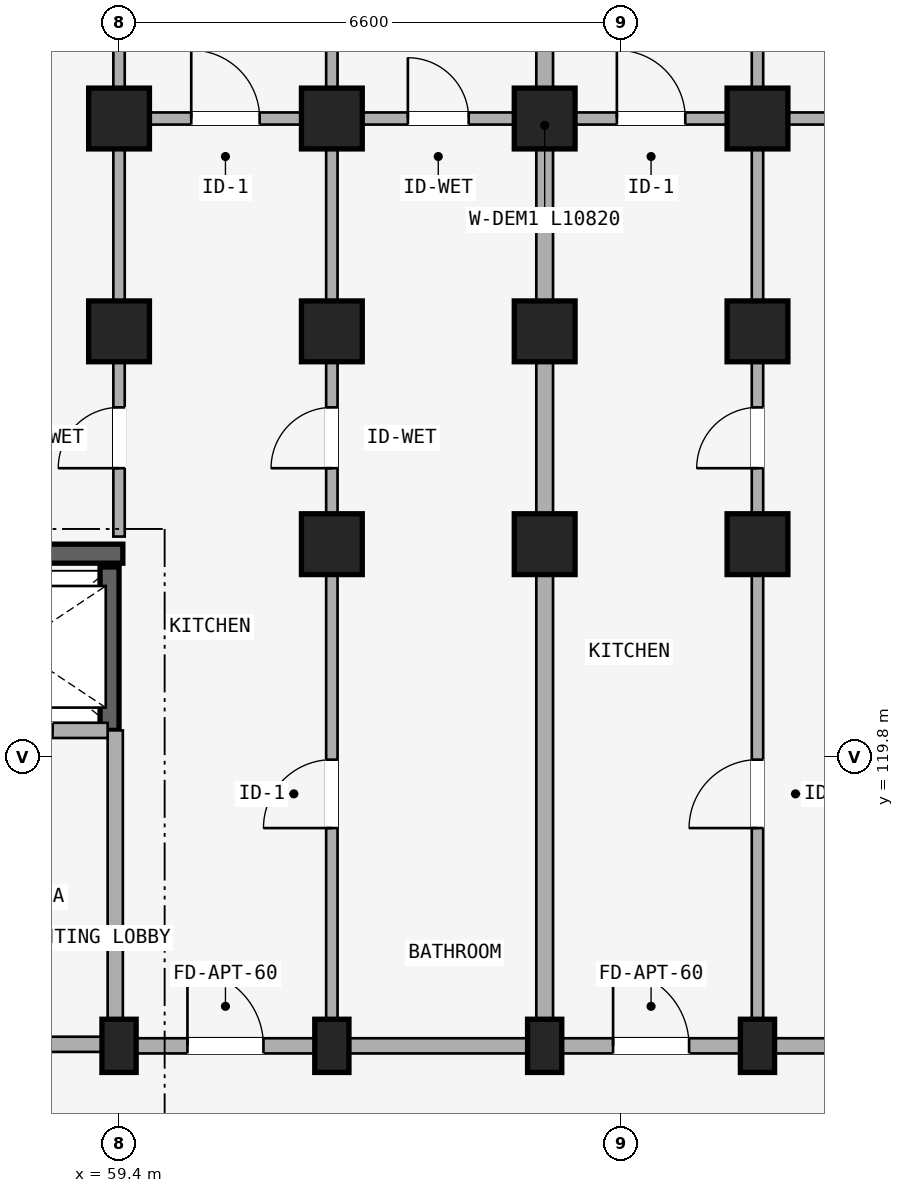
"""IFC4 building model, lengths in metres.
Left out: names, types, materials, properties, quantities, classifications, styles, units other than length and angle.
Written with IfcOpenShell. Run it as: python <this file> out.ifc"""

import sys

from ifc_helpers import new_model, si_unit, direction, frame, frame_2d, origin, origin_2d, place, context, subcontext, project, spatial, rectangle, extrude, element, fill, save


model = new_model("IFC4")
c1 = context("Model", 3, precision=1e-05, world=origin(), true_north=direction((0.0, 1.0)))
c2 = subcontext(c1, "Body", "Model", "MODEL_VIEW")
j1 = project(units=[si_unit("LENGTHUNIT", "METRE"), si_unit("PLANEANGLEUNIT", "RADIAN")], contexts=[c1])
p1 = place(None, origin())
s1 = spatial("IfcSite", under=j1, at=p1, CompositionType="ELEMENT")
p2 = place(p1, origin())
s2 = spatial("IfcBuilding", under=s1, at=p2, CompositionType="ELEMENT")
p3 = place(p2, frame((0.0, 0.0, 11.85)))
s3 = spatial("IfcBuildingStorey", under=s2, at=p3, CompositionType="ELEMENT", Elevation=11.85)
p4 = place(p3, frame((56.65, 122.475, 0.0), z_axis=(0.0, 0.0, 1.0), x_axis=(1.0, 0.0, 0.0)))
e1 = element("IfcWall", 1, at=p4, inside=s3, PredefinedType="SHEAR", context=c2, shape_type="SweptSolid", body=[
    extrude(rectangle(XDim=2.8, YDim=0.25, at=frame_2d((1.4, 0.0))), origin(), (0.0, 0.0, 1.0), 2.93),
])
p5 = place(p3, frame((59.275, 120.15, 0.0), z_axis=(0.0, 0.0, 1.0), x_axis=(0.0, 1.0, 0.0)))
e2 = element("IfcWall", 2, at=p5, inside=s3, PredefinedType="SHEAR", context=c2, shape_type="SweptSolid", body=[
    extrude(rectangle(XDim=2.15, YDim=0.25, at=frame_2d((1.075, 0.0))), origin(), (0.0, 0.0, 1.0), 2.93),
])
p6 = place(p3, frame((59.4, 116.0, 0.0), z_axis=(0.0, 0.0, 1.0), x_axis=(1.0, 0.0, 0.0)))
e3 = element("IfcColumn", 3, at=p6, inside=s3, PredefinedType="COLUMN", context=c2, shape_type="SweptSolid", body=[
    extrude(rectangle(XDim=0.45, YDim=0.7, at=origin_2d()), origin(), (0.0, 0.0, 1.0), 2.93),
])
for number, where, z_axis, x_axis in (
    (4, (59.4, 125.4, 0.0), (0.0, 0.0, 1.0), (1.0, 0.0, 0.0)),
    (5, (59.4, 128.2, 0.0), (0.0, 0.0, 1.0), (1.0, 0.0, 0.0)),
):
    element("IfcColumn", number, at=place(p3, frame(where, z_axis=z_axis, x_axis=x_axis)), inside=s3, PredefinedType="COLUMN", context=c2, shape_type="SweptSolid", body=[
        extrude(rectangle(XDim=0.8, YDim=0.8, at=origin_2d()), origin(), (0.0, 0.0, 1.0), 2.93),
    ])
p7 = place(p3, frame((62.2, 116.0, 0.0), z_axis=(0.0, 0.0, 1.0), x_axis=(1.0, 0.0, 0.0)))
e6 = element("IfcColumn", 6, at=p7, inside=s3, PredefinedType="COLUMN", context=c2, shape_type="SweptSolid", body=[
    extrude(rectangle(XDim=0.45, YDim=0.7, at=origin_2d()), origin(), (0.0, 0.0, 1.0), 2.93),
])
for number, where, z_axis, x_axis in (
    (7, (62.2, 122.6, 0.0), (0.0, 0.0, 1.0), (1.0, 0.0, 0.0)),
    (8, (62.2, 125.4, 0.0), (0.0, 0.0, 1.0), (1.0, 0.0, 0.0)),
    (9, (62.2, 128.2, 0.0), (0.0, 0.0, 1.0), (1.0, 0.0, 0.0)),
):
    element("IfcColumn", number, at=place(p3, frame(where, z_axis=z_axis, x_axis=x_axis)), inside=s3, PredefinedType="COLUMN", context=c2, shape_type="SweptSolid", body=[
        extrude(rectangle(XDim=0.8, YDim=0.8, at=origin_2d()), origin(), (0.0, 0.0, 1.0), 2.93),
    ])
p8 = place(p3, frame((65.0, 116.0, 0.0), z_axis=(0.0, 0.0, 1.0), x_axis=(1.0, 0.0, 0.0)))
e10 = element("IfcColumn", 10, at=p8, inside=s3, PredefinedType="COLUMN", context=c2, shape_type="SweptSolid", body=[
    extrude(rectangle(XDim=0.45, YDim=0.7, at=origin_2d()), origin(), (0.0, 0.0, 1.0), 2.93),
])
for number, where, z_axis, x_axis in (
    (11, (65.0, 122.6, 0.0), (0.0, 0.0, 1.0), (1.0, 0.0, 0.0)),
    (12, (65.0, 125.4, 0.0), (0.0, 0.0, 1.0), (1.0, 0.0, 0.0)),
    (13, (65.0, 128.2, 0.0), (0.0, 0.0, 1.0), (1.0, 0.0, 0.0)),
):
    element("IfcColumn", number, at=place(p3, frame(where, z_axis=z_axis, x_axis=x_axis)), inside=s3, PredefinedType="COLUMN", context=c2, shape_type="SweptSolid", body=[
        extrude(rectangle(XDim=0.8, YDim=0.8, at=origin_2d()), origin(), (0.0, 0.0, 1.0), 2.93),
    ])
p9 = place(p3, frame((67.8, 116.0, 0.0), z_axis=(0.0, 0.0, 1.0), x_axis=(1.0, 0.0, 0.0)))
e14 = element("IfcColumn", 14, at=p9, inside=s3, PredefinedType="COLUMN", context=c2, shape_type="SweptSolid", body=[
    extrude(rectangle(XDim=0.45, YDim=0.7, at=origin_2d()), origin(), (0.0, 0.0, 1.0), 2.93),
])
for number, where, z_axis, x_axis in (
    (15, (67.8, 122.6, 0.0), (0.0, 0.0, 1.0), (1.0, 0.0, 0.0)),
    (16, (67.8, 125.4, 0.0), (0.0, 0.0, 1.0), (1.0, 0.0, 0.0)),
    (17, (67.8, 128.2, 0.0), (0.0, 0.0, 1.0), (1.0, 0.0, 0.0)),
):
    element("IfcColumn", number, at=place(p3, frame(where, z_axis=z_axis, x_axis=x_axis)), inside=s3, PredefinedType="COLUMN", context=c2, shape_type="SweptSolid", body=[
        extrude(rectangle(XDim=0.8, YDim=0.8, at=origin_2d()), origin(), (0.0, 0.0, 1.0), 2.93),
    ])
p10 = place(p3, frame((53.7, 116.02, 0.0), z_axis=(0.0, 0.0, 1.0), x_axis=(1.0, 0.0, 0.0)))
e18 = element("IfcWall", 18, at=p10, inside=s3, PredefinedType="STANDARD", context=c2, shape_type="SweptSolid", body=[
    extrude(rectangle(XDim=5.65, YDim=0.2, at=frame_2d((2.825, 0.0))), origin(), (0.0, 0.0, 1.0), 2.372),
])
p11 = place(p10, frame((1.923, 0.0, 0.0)))
e19 = element("IfcOpeningElement", 19, at=p11, cuts=e18, PredefinedType="OPENING", context=c2, shape_type="SweptSolid", body=[
    extrude(rectangle(XDim=1.24, YDim=2.15, at=frame_2d((0.62, 1.075))), frame((0.0, 0.11, 0.0), z_axis=(0.0, -1.0, 0.0), x_axis=(1.0, 0.0, 0.0)), (0.0, 0.0, 1.0), 0.22),
])
p12 = place(p3, frame((59.35, 116.02, 0.0), z_axis=(0.0, 0.0, 1.0), x_axis=(0.0, 1.0, 0.0)))
e20 = element("IfcWall", 20, at=p12, inside=s3, PredefinedType="STANDARD", context=c2, shape_type="SweptSolid", body=[
    extrude(rectangle(XDim=4.13, YDim=0.2, at=frame_2d((2.065, 0.0))), origin(), (0.0, 0.0, 1.0), 2.372),
])
p13 = place(p3, frame((56.7, 120.15, 0.0), z_axis=(0.0, 0.0, 1.0), x_axis=(1.0, 0.0, 0.0)))
e21 = element("IfcWall", 21, at=p13, inside=s3, PredefinedType="STANDARD", context=c2, shape_type="SweptSolid", body=[
    extrude(rectangle(XDim=2.55, YDim=0.2, at=frame_2d((1.275, 0.0))), origin(), (0.0, 0.0, 1.0), 2.372),
])
p14 = place(p13, frame((0.725, 0.0, 0.0)))
e22 = element("IfcOpeningElement", 22, at=p14, cuts=e21, PredefinedType="OPENING", context=c2, shape_type="SweptSolid", body=[
    extrude(rectangle(XDim=1.1, YDim=2.15, at=frame_2d((0.55, 1.075))), frame((0.0, 0.11, 0.0), z_axis=(0.0, -1.0, 0.0), x_axis=(1.0, 0.0, 0.0)), (0.0, 0.0, 1.0), 0.22),
])
p15 = place(p3, frame((59.4, 116.0, 0.0), z_axis=(0.0, 0.0, 1.0), x_axis=(1.0, 0.0, 0.0)))
e23 = element("IfcWall", 23, at=p15, inside=s3, PredefinedType="STANDARD", context=c2, shape_type="SweptSolid", body=[
    extrude(rectangle(XDim=2.8, YDim=0.2, at=frame_2d((1.4, 0.0))), origin(), (0.0, 0.0, 1.0), 2.372),
])
p16 = place(p15, frame((0.9, 0.0, 0.0)))
e24 = element("IfcOpeningElement", 24, at=p16, cuts=e23, PredefinedType="OPENING", context=c2, shape_type="SweptSolid", body=[
    extrude(rectangle(XDim=1.0, YDim=2.15, at=frame_2d((0.5, 1.075))), frame((0.0, 0.11, 0.0), z_axis=(0.0, -1.0, 0.0), x_axis=(1.0, 0.0, 0.0)), (0.0, 0.0, 1.0), 0.22),
])
p17 = place(p3, frame((59.48, 128.2, 0.0), z_axis=(0.0, 0.0, 1.0), x_axis=(1.0, 0.0, 0.0)))
e25 = element("IfcWall", 25, at=p17, inside=s3, PredefinedType="PLUMBINGWALL", context=c2, shape_type="SweptSolid", body=[
    extrude(rectangle(XDim=2.64, YDim=0.16, at=frame_2d((1.32, 0.0))), origin(), (0.0, 0.0, 1.0), 2.372),
])
p18 = place(p17, frame((0.87, 0.0, 0.0)))
e26 = element("IfcOpeningElement", 26, at=p18, cuts=e25, PredefinedType="OPENING", context=c2, shape_type="SweptSolid", body=[
    extrude(rectangle(XDim=0.9, YDim=2.1, at=frame_2d((0.45, 1.05))), frame((0.0, 0.09, 0.0), z_axis=(0.0, -1.0, 0.0), x_axis=(1.0, 0.0, 0.0)), (0.0, 0.0, 1.0), 0.18),
])
p19 = place(p3, frame((62.2, 116.0, 0.0), z_axis=(0.0, 0.0, 1.0), x_axis=(1.0, 0.0, 0.0)))
e27 = element("IfcWall", 27, at=p19, inside=s3, PredefinedType="STANDARD", context=c2, shape_type="SweptSolid", body=[
    extrude(rectangle(XDim=2.8, YDim=0.2, at=frame_2d((1.4, 0.0))), origin(), (0.0, 0.0, 1.0), 2.372),
])
p20 = place(p3, frame((62.28, 128.2, 0.0), z_axis=(0.0, 0.0, 1.0), x_axis=(1.0, 0.0, 0.0)))
e28 = element("IfcWall", 28, at=p20, inside=s3, PredefinedType="PLUMBINGWALL", context=c2, shape_type="SweptSolid", body=[
    extrude(rectangle(XDim=2.64, YDim=0.16, at=frame_2d((1.32, 0.0))), origin(), (0.0, 0.0, 1.0), 2.372),
])
p21 = place(p20, frame((0.92, 0.0, 0.0)))
e29 = element("IfcOpeningElement", 29, at=p21, cuts=e28, PredefinedType="OPENING", context=c2, shape_type="SweptSolid", body=[
    extrude(rectangle(XDim=0.8, YDim=2.1, at=frame_2d((0.4, 1.05))), frame((0.0, 0.09, 0.0), z_axis=(0.0, -1.0, 0.0), x_axis=(1.0, 0.0, 0.0)), (0.0, 0.0, 1.0), 0.18),
])
p22 = place(p3, frame((65.0, 116.0, 0.0), z_axis=(0.0, 0.0, 1.0), x_axis=(1.0, 0.0, 0.0)))
e30 = element("IfcWall", 30, at=p22, inside=s3, PredefinedType="STANDARD", context=c2, shape_type="SweptSolid", body=[
    extrude(rectangle(XDim=2.8, YDim=0.2, at=frame_2d((1.4, 0.0))), origin(), (0.0, 0.0, 1.0), 2.372),
])
p23 = place(p22, frame((0.9, 0.0, 0.0)))
e31 = element("IfcOpeningElement", 31, at=p23, cuts=e30, PredefinedType="OPENING", context=c2, shape_type="SweptSolid", body=[
    extrude(rectangle(XDim=1.0, YDim=2.15, at=frame_2d((0.5, 1.075))), frame((0.0, 0.11, 0.0), z_axis=(0.0, -1.0, 0.0), x_axis=(1.0, 0.0, 0.0)), (0.0, 0.0, 1.0), 0.22),
])
p24 = place(p3, frame((65.08, 128.2, 0.0), z_axis=(0.0, 0.0, 1.0), x_axis=(1.0, 0.0, 0.0)))
e32 = element("IfcWall", 32, at=p24, inside=s3, PredefinedType="PLUMBINGWALL", context=c2, shape_type="SweptSolid", body=[
    extrude(rectangle(XDim=2.64, YDim=0.16, at=frame_2d((1.32, 0.0))), origin(), (0.0, 0.0, 1.0), 2.372),
])
p25 = place(p24, frame((0.87, 0.0, 0.0)))
e33 = element("IfcOpeningElement", 33, at=p25, cuts=e32, PredefinedType="OPENING", context=c2, shape_type="SweptSolid", body=[
    extrude(rectangle(XDim=0.9, YDim=2.1, at=frame_2d((0.45, 1.05))), frame((0.0, 0.09, 0.0), z_axis=(0.0, -1.0, 0.0), x_axis=(1.0, 0.0, 0.0)), (0.0, 0.0, 1.0), 0.18),
])
p26 = place(p3, frame((67.8, 116.0, 0.0), z_axis=(0.0, 0.0, 1.0), x_axis=(1.0, 0.0, 0.0)))
e34 = element("IfcWall", 34, at=p26, inside=s3, PredefinedType="STANDARD", context=c2, shape_type="SweptSolid", body=[
    extrude(rectangle(XDim=2.8, YDim=0.2, at=frame_2d((1.4, 0.0))), origin(), (0.0, 0.0, 1.0), 2.372),
])
p27 = place(p3, frame((67.88, 128.2, 0.0), z_axis=(0.0, 0.0, 1.0), x_axis=(1.0, 0.0, 0.0)))
e35 = element("IfcWall", 35, at=p27, inside=s3, PredefinedType="PLUMBINGWALL", context=c2, shape_type="SweptSolid", body=[
    extrude(rectangle(XDim=2.64, YDim=0.16, at=frame_2d((1.32, 0.0))), origin(), (0.0, 0.0, 1.0), 2.372),
])
p28 = place(p27, frame((0.92, 0.0, 0.0)))
e36 = element("IfcOpeningElement", 36, at=p28, cuts=e35, PredefinedType="OPENING", context=c2, shape_type="SweptSolid", body=[
    extrude(rectangle(XDim=0.8, YDim=2.1, at=frame_2d((0.4, 1.05))), frame((0.0, 0.09, 0.0), z_axis=(0.0, -1.0, 0.0), x_axis=(1.0, 0.0, 0.0)), (0.0, 0.0, 1.0), 0.18),
])
p29 = place(p3, frame((59.4, 122.7, 0.0), z_axis=(0.0, 0.0, 1.0), x_axis=(0.0, 1.0, 0.0)))
e37 = element("IfcWall", 37, at=p29, inside=s3, PredefinedType="PARTITIONING", context=c2, shape_type="SweptSolid", body=[
    extrude(rectangle(XDim=10.82, YDim=0.15, at=frame_2d((5.41, 0.0))), origin(), (0.0, 0.0, 1.0), 2.372),
])
p30 = place(p29, frame((0.899, 0.0, 0.0)))
e38 = element("IfcOpeningElement", 38, at=p30, cuts=e37, PredefinedType="OPENING", context=c2, shape_type="SweptSolid", body=[
    extrude(rectangle(XDim=0.8, YDim=2.1, at=frame_2d((0.4, 1.05))), frame((0.0, 0.085, 0.0), z_axis=(0.0, -1.0, 0.0), x_axis=(1.0, 0.0, 0.0)), (0.0, 0.0, 1.0), 0.17),
])
p31 = place(p3, frame((62.2, 116.05, 0.0), z_axis=(0.0, 0.0, 1.0), x_axis=(0.0, 1.0, 0.0)))
e39 = element("IfcWall", 39, at=p31, inside=s3, PredefinedType="PARTITIONING", context=c2, shape_type="SweptSolid", body=[
    extrude(rectangle(XDim=6.53, YDim=0.15, at=frame_2d((3.265, 0.0))), origin(), (0.0, 0.0, 1.0), 2.372),
])
p32 = place(p31, frame((2.815, 0.0, 0.0)))
e40 = element("IfcOpeningElement", 40, at=p32, cuts=e39, PredefinedType="OPENING", context=c2, shape_type="SweptSolid", body=[
    extrude(rectangle(XDim=0.9, YDim=2.1, at=frame_2d((0.45, 1.05))), frame((0.0, 0.085, 0.0), z_axis=(0.0, -1.0, 0.0), x_axis=(1.0, 0.0, 0.0)), (0.0, 0.0, 1.0), 0.17),
])
p33 = place(p3, frame((62.2, 122.7, 0.0), z_axis=(0.0, 0.0, 1.0), x_axis=(0.0, 1.0, 0.0)))
e41 = element("IfcWall", 41, at=p33, inside=s3, PredefinedType="PARTITIONING", context=c2, shape_type="SweptSolid", body=[
    extrude(rectangle(XDim=10.82, YDim=0.15, at=frame_2d((5.41, 0.0))), origin(), (0.0, 0.0, 1.0), 2.372),
])
p34 = place(p33, frame((0.899, 0.0, 0.0)))
e42 = element("IfcOpeningElement", 42, at=p34, cuts=e41, PredefinedType="OPENING", context=c2, shape_type="SweptSolid", body=[
    extrude(rectangle(XDim=0.8, YDim=2.1, at=frame_2d((0.4, 1.05))), frame((0.0, 0.085, 0.0), z_axis=(0.0, -1.0, 0.0), x_axis=(1.0, 0.0, 0.0)), (0.0, 0.0, 1.0), 0.17),
])
p35 = place(p3, frame((65.0, 116.05, 0.0), z_axis=(0.0, 0.0, 1.0), x_axis=(0.0, 1.0, 0.0)))
e43 = element("IfcWall", 43, at=p35, inside=s3, PredefinedType="STANDARD", context=c2, shape_type="SweptSolid", body=[
    extrude(rectangle(XDim=6.53, YDim=0.22, at=frame_2d((3.265, 0.0))), origin(), (0.0, 0.0, 1.0), 2.372),
])
p36 = place(p3, frame((65.0, 122.7, 0.0), z_axis=(0.0, 0.0, 1.0), x_axis=(0.0, 1.0, 0.0)))
e44 = element("IfcWall", 44, at=p36, inside=s3, PredefinedType="STANDARD", context=c2, shape_type="SweptSolid", body=[
    extrude(rectangle(XDim=10.82, YDim=0.22, at=frame_2d((5.41, 0.0))), origin(), (0.0, 0.0, 1.0), 2.372),
])
p37 = place(p3, frame((67.8, 116.05, 0.0), z_axis=(0.0, 0.0, 1.0), x_axis=(0.0, 1.0, 0.0)))
e45 = element("IfcWall", 45, at=p37, inside=s3, PredefinedType="PARTITIONING", context=c2, shape_type="SweptSolid", body=[
    extrude(rectangle(XDim=6.53, YDim=0.15, at=frame_2d((3.265, 0.0))), origin(), (0.0, 0.0, 1.0), 2.372),
])
p38 = place(p37, frame((2.815, 0.0, 0.0)))
e46 = element("IfcOpeningElement", 46, at=p38, cuts=e45, PredefinedType="OPENING", context=c2, shape_type="SweptSolid", body=[
    extrude(rectangle(XDim=0.9, YDim=2.1, at=frame_2d((0.45, 1.05))), frame((0.0, 0.085, 0.0), z_axis=(0.0, -1.0, 0.0), x_axis=(1.0, 0.0, 0.0)), (0.0, 0.0, 1.0), 0.17),
])
p39 = place(p3, frame((67.8, 122.7, 0.0), z_axis=(0.0, 0.0, 1.0), x_axis=(0.0, 1.0, 0.0)))
e47 = element("IfcWall", 47, at=p39, inside=s3, PredefinedType="PARTITIONING", context=c2, shape_type="SweptSolid", body=[
    extrude(rectangle(XDim=10.82, YDim=0.15, at=frame_2d((5.41, 0.0))), origin(), (0.0, 0.0, 1.0), 2.372),
])
p40 = place(p39, frame((0.899, 0.0, 0.0)))
e48 = element("IfcOpeningElement", 48, at=p40, cuts=e47, PredefinedType="OPENING", context=c2, shape_type="SweptSolid", body=[
    extrude(rectangle(XDim=0.8, YDim=2.1, at=frame_2d((0.4, 1.05))), frame((0.0, 0.085, 0.0), z_axis=(0.0, -1.0, 0.0), x_axis=(1.0, 0.0, 0.0)), (0.0, 0.0, 1.0), 0.17),
])
p41 = place(p14, origin())
e49 = element("IfcDoor", 49, at=p41, inside=s3, OperationType="SLIDING_TO_LEFT", PredefinedType="DOOR", context=c2, shape_type="SweptSolid", body=[
    extrude(rectangle(XDim=1.1, YDim=2.15, at=frame_2d((0.55, 1.075))), frame((0.0, 0.025, 0.0), z_axis=(0.0, -1.0, 0.0), x_axis=(1.0, 0.0, 0.0)), (0.0, 0.0, 1.0), 0.05),
])
fill(e22, e49)
p42 = place(p18, origin())
e50 = element("IfcDoor", 50, at=p42, inside=s3, OperationType="SINGLE_SWING_LEFT", PredefinedType="DOOR", context=c2, shape_type="SweptSolid", body=[
    extrude(rectangle(XDim=0.9, YDim=2.1, at=frame_2d((0.45, 1.05))), frame((0.0, 0.025, 0.0), z_axis=(0.0, -1.0, 0.0), x_axis=(1.0, 0.0, 0.0)), (0.0, 0.0, 1.0), 0.05),
])
fill(e26, e50)
p43 = place(p16, frame((1.0, 0.0, 0.0), z_axis=(0.0, 0.0, 1.0), x_axis=(-1.0, 0.0, 0.0)))
e51 = element("IfcDoor", 51, at=p43, inside=s3, OperationType="SINGLE_SWING_RIGHT", PredefinedType="DOOR", context=c2, shape_type="SweptSolid", body=[
    extrude(rectangle(XDim=1.0, YDim=2.15, at=frame_2d((0.5, 1.075))), frame((0.0, 0.025, 0.0), z_axis=(0.0, -1.0, 0.0), x_axis=(1.0, 0.0, 0.0)), (0.0, 0.0, 1.0), 0.05),
])
fill(e24, e51)
p44 = place(p21, origin())
e52 = element("IfcDoor", 52, at=p44, inside=s3, OperationType="SINGLE_SWING_LEFT", PredefinedType="DOOR", context=c2, shape_type="SweptSolid", body=[
    extrude(rectangle(XDim=0.8, YDim=2.1, at=frame_2d((0.4, 1.05))), frame((0.0, 0.025, 0.0), z_axis=(0.0, -1.0, 0.0), x_axis=(1.0, 0.0, 0.0)), (0.0, 0.0, 1.0), 0.05),
])
fill(e29, e52)
p45 = place(p25, origin())
e53 = element("IfcDoor", 53, at=p45, inside=s3, OperationType="SINGLE_SWING_LEFT", PredefinedType="DOOR", context=c2, shape_type="SweptSolid", body=[
    extrude(rectangle(XDim=0.9, YDim=2.1, at=frame_2d((0.45, 1.05))), frame((0.0, 0.025, 0.0), z_axis=(0.0, -1.0, 0.0), x_axis=(1.0, 0.0, 0.0)), (0.0, 0.0, 1.0), 0.05),
])
fill(e33, e53)
p46 = place(p23, frame((1.0, 0.0, 0.0), z_axis=(0.0, 0.0, 1.0), x_axis=(-1.0, 0.0, 0.0)))
e54 = element("IfcDoor", 54, at=p46, inside=s3, OperationType="SINGLE_SWING_RIGHT", PredefinedType="DOOR", context=c2, shape_type="SweptSolid", body=[
    extrude(rectangle(XDim=1.0, YDim=2.15, at=frame_2d((0.5, 1.075))), frame((0.0, 0.025, 0.0), z_axis=(0.0, -1.0, 0.0), x_axis=(1.0, 0.0, 0.0)), (0.0, 0.0, 1.0), 0.05),
])
fill(e31, e54)
p47 = place(p30, frame((0.8, 0.0, 0.0), z_axis=(0.0, 0.0, 1.0), x_axis=(-1.0, 0.0, 0.0)))
e55 = element("IfcDoor", 55, at=p47, inside=s3, OperationType="SINGLE_SWING_RIGHT", PredefinedType="DOOR", context=c2, shape_type="SweptSolid", body=[
    extrude(rectangle(XDim=0.8, YDim=2.1, at=frame_2d((0.4, 1.05))), frame((0.0, 0.025, 0.0), z_axis=(0.0, -1.0, 0.0), x_axis=(1.0, 0.0, 0.0)), (0.0, 0.0, 1.0), 0.05),
])
fill(e38, e55)
p48 = place(p32, frame((0.9, 0.0, 0.0), z_axis=(0.0, 0.0, 1.0), x_axis=(-1.0, 0.0, 0.0)))
e56 = element("IfcDoor", 56, at=p48, inside=s3, OperationType="SINGLE_SWING_RIGHT", PredefinedType="DOOR", context=c2, shape_type="SweptSolid", body=[
    extrude(rectangle(XDim=0.9, YDim=2.1, at=frame_2d((0.45, 1.05))), frame((0.0, 0.025, 0.0), z_axis=(0.0, -1.0, 0.0), x_axis=(1.0, 0.0, 0.0)), (0.0, 0.0, 1.0), 0.05),
])
fill(e40, e56)
p49 = place(p34, origin())
e57 = element("IfcDoor", 57, at=p49, inside=s3, OperationType="SINGLE_SWING_LEFT", PredefinedType="DOOR", context=c2, shape_type="SweptSolid", body=[
    extrude(rectangle(XDim=0.8, YDim=2.1, at=frame_2d((0.4, 1.05))), frame((0.0, 0.025, 0.0), z_axis=(0.0, -1.0, 0.0), x_axis=(1.0, 0.0, 0.0)), (0.0, 0.0, 1.0), 0.05),
])
fill(e42, e57)
p50 = place(p38, origin())
e58 = element("IfcDoor", 58, at=p50, inside=s3, OperationType="SINGLE_SWING_LEFT", PredefinedType="DOOR", context=c2, shape_type="SweptSolid", body=[
    extrude(rectangle(XDim=0.9, YDim=2.1, at=frame_2d((0.45, 1.05))), frame((0.0, 0.025, 0.0), z_axis=(0.0, -1.0, 0.0), x_axis=(1.0, 0.0, 0.0)), (0.0, 0.0, 1.0), 0.05),
])
fill(e46, e58)
p51 = place(p40, frame((0.8, 0.0, 0.0), z_axis=(0.0, 0.0, 1.0), x_axis=(-1.0, 0.0, 0.0)))
e59 = element("IfcDoor", 59, at=p51, inside=s3, OperationType="SINGLE_SWING_RIGHT", PredefinedType="DOOR", context=c2, shape_type="SweptSolid", body=[
    extrude(rectangle(XDim=0.8, YDim=2.1, at=frame_2d((0.4, 1.05))), frame((0.0, 0.025, 0.0), z_axis=(0.0, -1.0, 0.0), x_axis=(1.0, 0.0, 0.0)), (0.0, 0.0, 1.0), 0.05),
])
fill(e48, e59)
save(model, sys.argv[1])
